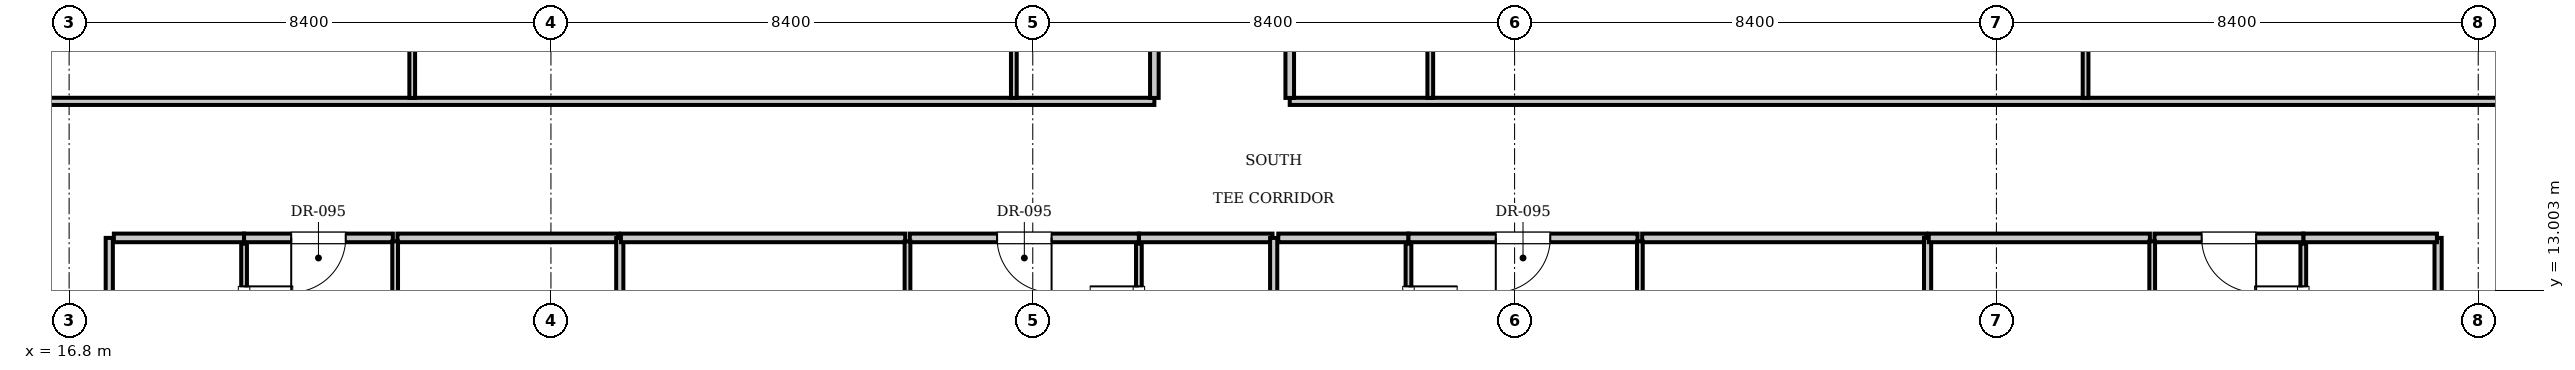
"""IFC4 building model, lengths in metres.
Left out: names, types, materials, properties, quantities, classifications, styles, units other than length and angle.
Written with IfcOpenShell. Run it as: python <this file> out.ifc"""

import sys

from ifc_helpers import new_model, si_unit, direction, frame, frame_2d, origin, place, context, subcontext, project, spatial, rectangle, extrude, element, fill, save


model = new_model("IFC4")
c1 = context("Model", 3, precision=1e-05, world=origin(), true_north=direction((0.0, 1.0)))
c2 = subcontext(c1, "Body", "Model", "MODEL_VIEW")
j1 = project(units=[si_unit("LENGTHUNIT", "METRE"), si_unit("PLANEANGLEUNIT", "RADIAN")], contexts=[c1])
p1 = place(None, origin())
s1 = spatial("IfcSite", under=j1, at=p1, CompositionType="ELEMENT")
p2 = place(p1, origin())
s2 = spatial("IfcBuilding", under=s1, at=p2, CompositionType="ELEMENT")
p3 = place(p2, frame((0.0, 0.0, 185.15)))
s3 = spatial("IfcBuildingStorey", under=s2, at=p3, CompositionType="ELEMENT", Elevation=185.15)
for number, where, z_axis, x_axis in (
    (1, (17.5, 9.0, 0.0), (0.0, 0.0, 1.0), (0.0, 1.0, 0.0)),
    (2, (58.1, 9.0, 0.0), (0.0, 0.0, 1.0), (0.0, 1.0, 0.0)),
):
    element("IfcWall", number, at=place(p3, frame(where, z_axis=z_axis, x_axis=x_axis)), inside=s3, PredefinedType="PARTITIONING", context=c2, shape_type="SweptSolid", body=[
        extrude(rectangle(XDim=4.92, YDim=0.125, at=frame_2d((2.46, 0.0))), origin(), (0.0, 0.0, 1.0), 3.61),
    ])
p4 = place(p3, frame((17.58, 13.92, 0.0), z_axis=(0.0, 0.0, 1.0), x_axis=(1.0, 0.0, 0.0)))
e3 = element("IfcWall", 3, at=p4, inside=s3, PredefinedType="PARTITIONING", context=c2, shape_type="SweptSolid", body=[
    extrude(rectangle(XDim=2.27, YDim=0.15, at=frame_2d((1.135, 0.0))), origin(), (0.0, 0.0, 1.0), 3.61),
])
p5 = place(p3, frame((19.85, 11.48, 0.0), z_axis=(0.0, 0.0, 1.0), x_axis=(0.0, 1.0, 0.0)))
e4 = element("IfcWall", 4, at=p5, inside=s3, PredefinedType="PARTITIONING", context=c2, shape_type="SweptSolid", body=[
    extrude(rectangle(XDim=2.34, YDim=0.1, at=frame_2d((1.17, 0.0))), origin(), (0.0, 0.0, 1.0), 3.61),
])
p6 = place(p5, frame((0.745, 0.0, 0.0)))
e5 = element("IfcOpeningElement", 5, at=p6, cuts=e4, PredefinedType="OPENING", context=c2, shape_type="SweptSolid", body=[
    extrude(rectangle(XDim=0.85, YDim=2.1, at=frame_2d((0.425, 1.05))), frame((0.0, 0.06, 0.0), z_axis=(0.0, -1.0, 0.0), x_axis=(1.0, 0.0, 0.0)), (0.0, 0.0, 1.0), 0.12),
])
p7 = place(p3, frame((19.85, 13.92, 0.0), z_axis=(0.0, 0.0, 1.0), x_axis=(1.0, 0.0, 0.0)))
e6 = element("IfcWall", 6, at=p7, inside=s3, PredefinedType="PARTITIONING", context=c2, shape_type="SweptSolid", body=[
    extrude(rectangle(XDim=2.594, YDim=0.15, at=frame_2d((1.297, 0.0))), origin(), (0.0, 0.0, 1.0), 3.61),
])
p8 = place(p7, frame((0.822, 0.0, 0.0)))
e7 = element("IfcOpeningElement", 7, at=p8, cuts=e6, PredefinedType="OPENING", context=c2, shape_type="SweptSolid", body=[
    extrude(rectangle(XDim=0.95, YDim=2.15, at=frame_2d((0.475, 1.075))), frame((0.0, 0.085, 0.0), z_axis=(0.0, -1.0, 0.0), x_axis=(1.0, 0.0, 0.0)), (0.0, 0.0, 1.0), 0.17),
])
p9 = place(p3, frame((22.524, 13.92, 0.0), z_axis=(0.0, 0.0, 1.0), x_axis=(1.0, 0.0, 0.0)))
e8 = element("IfcWall", 8, at=p9, inside=s3, PredefinedType="PARTITIONING", context=c2, shape_type="SweptSolid", body=[
    extrude(rectangle(XDim=3.856, YDim=0.15, at=frame_2d((1.928, 0.0))), origin(), (0.0, 0.0, 1.0), 3.61),
])
p10 = place(p3, frame((22.484, 4.63, 0.0), z_axis=(0.0, 0.0, 1.0), x_axis=(0.0, 1.0, 0.0)))
e9 = element("IfcWall", 9, at=p10, inside=s3, PredefinedType="PARTITIONING", context=c2, shape_type="SweptSolid", body=[
    extrude(rectangle(XDim=9.23, YDim=0.1, at=frame_2d((4.615, 0.0))), origin(), (0.0, 0.0, 1.0), 3.61),
])
p11 = place(p10, frame((1.6, 0.0, 0.0)))
e10 = element("IfcOpeningElement", 10, at=p11, cuts=e9, PredefinedType="OPENING", context=c2, shape_type="SweptSolid", body=[
    extrude(rectangle(XDim=0.9, YDim=2.1, at=frame_2d((0.45, 1.05))), frame((0.0, 0.06, 0.0), z_axis=(0.0, -1.0, 0.0), x_axis=(1.0, 0.0, 0.0)), (0.0, 0.0, 1.0), 0.12),
])
p12 = place(p3, frame((26.4, 4.7, 0.0), z_axis=(0.0, 0.0, 1.0), x_axis=(0.0, 1.0, 0.0)))
e11 = element("IfcWall", 11, at=p12, inside=s3, PredefinedType="PARTITIONING", context=c2, shape_type="SweptSolid", body=[
    extrude(rectangle(XDim=9.22, YDim=0.125, at=frame_2d((4.61, 0.0))), origin(), (0.0, 0.0, 1.0), 3.61),
])
p13 = place(p3, frame((35.45, 13.92, 0.0), z_axis=(0.0, 0.0, 1.0), x_axis=(1.0, 0.0, 0.0)))
e12 = element("IfcWall", 12, at=p13, inside=s3, PredefinedType="PARTITIONING", context=c2, shape_type="SweptSolid", body=[
    extrude(rectangle(XDim=2.33, YDim=0.15, at=frame_2d((1.165, 0.0))), origin(), (0.0, 0.0, 1.0), 3.61),
])
p14 = place(p3, frame((35.45, 11.48, 0.0), z_axis=(0.0, 0.0, 1.0), x_axis=(0.0, 1.0, 0.0)))
e13 = element("IfcWall", 13, at=p14, inside=s3, PredefinedType="PARTITIONING", context=c2, shape_type="SweptSolid", body=[
    extrude(rectangle(XDim=2.34, YDim=0.1, at=frame_2d((1.17, 0.0))), origin(), (0.0, 0.0, 1.0), 3.61),
])
p15 = place(p14, frame((0.745, 0.0, 0.0)))
e14 = element("IfcOpeningElement", 14, at=p15, cuts=e13, PredefinedType="OPENING", context=c2, shape_type="SweptSolid", body=[
    extrude(rectangle(XDim=0.85, YDim=2.1, at=frame_2d((0.425, 1.05))), frame((0.0, 0.06, 0.0), z_axis=(0.0, -1.0, 0.0), x_axis=(1.0, 0.0, 0.0)), (0.0, 0.0, 1.0), 0.12),
])
p16 = place(p3, frame((26.42, 13.92, 0.0), z_axis=(0.0, 0.0, 1.0), x_axis=(1.0, 0.0, 0.0)))
e15 = element("IfcWall", 15, at=p16, inside=s3, PredefinedType="PARTITIONING", context=c2, shape_type="SweptSolid", body=[
    extrude(rectangle(XDim=4.956, YDim=0.15, at=frame_2d((2.478, 0.0))), origin(), (0.0, 0.0, 1.0), 3.61),
])
p17 = place(p3, frame((31.456, 13.92, 0.0), z_axis=(0.0, 0.0, 1.0), x_axis=(1.0, 0.0, 0.0)))
e16 = element("IfcWall", 16, at=p17, inside=s3, PredefinedType="PARTITIONING", context=c2, shape_type="SweptSolid", body=[
    extrude(rectangle(XDim=3.994, YDim=0.15, at=frame_2d((1.997, 0.0))), origin(), (0.0, 0.0, 1.0), 3.61),
])
p18 = place(p17, frame((1.522, 0.0, 0.0)))
e17 = element("IfcOpeningElement", 17, at=p18, cuts=e16, PredefinedType="OPENING", context=c2, shape_type="SweptSolid", body=[
    extrude(rectangle(XDim=0.95, YDim=2.15, at=frame_2d((0.475, 1.075))), frame((0.0, 0.085, 0.0), z_axis=(0.0, -1.0, 0.0), x_axis=(1.0, 0.0, 0.0)), (0.0, 0.0, 1.0), 0.17),
])
p19 = place(p3, frame((31.416, 4.63, 0.0), z_axis=(0.0, 0.0, 1.0), x_axis=(0.0, 1.0, 0.0)))
e18 = element("IfcWall", 18, at=p19, inside=s3, PredefinedType="PARTITIONING", context=c2, shape_type="SweptSolid", body=[
    extrude(rectangle(XDim=9.23, YDim=0.1, at=frame_2d((4.615, 0.0))), origin(), (0.0, 0.0, 1.0), 3.61),
])
p20 = place(p19, frame((1.6, 0.0, 0.0)))
e19 = element("IfcOpeningElement", 19, at=p20, cuts=e18, PredefinedType="OPENING", context=c2, shape_type="SweptSolid", body=[
    extrude(rectangle(XDim=0.9, YDim=2.1, at=frame_2d((0.45, 1.05))), frame((0.0, 0.06, 0.0), z_axis=(0.0, -1.0, 0.0), x_axis=(1.0, 0.0, 0.0)), (0.0, 0.0, 1.0), 0.12),
])
p21 = place(p3, frame((37.8, 4.7, 0.0), z_axis=(0.0, 0.0, 1.0), x_axis=(0.0, 1.0, 0.0)))
e20 = element("IfcWall", 20, at=p21, inside=s3, PredefinedType="PARTITIONING", context=c2, shape_type="SweptSolid", body=[
    extrude(rectangle(XDim=9.22, YDim=0.125, at=frame_2d((4.61, 0.0))), origin(), (0.0, 0.0, 1.0), 3.293),
])
p22 = place(p3, frame((37.88, 13.92, 0.0), z_axis=(0.0, 0.0, 1.0), x_axis=(1.0, 0.0, 0.0)))
e21 = element("IfcWall", 21, at=p22, inside=s3, PredefinedType="PARTITIONING", context=c2, shape_type="SweptSolid", body=[
    extrude(rectangle(XDim=2.27, YDim=0.15, at=frame_2d((1.135, 0.0))), origin(), (0.0, 0.0, 1.0), 3.61),
])
p23 = place(p3, frame((40.15, 11.48, 0.0), z_axis=(0.0, 0.0, 1.0), x_axis=(0.0, 1.0, 0.0)))
e22 = element("IfcWall", 22, at=p23, inside=s3, PredefinedType="PARTITIONING", context=c2, shape_type="SweptSolid", body=[
    extrude(rectangle(XDim=2.34, YDim=0.1, at=frame_2d((1.17, 0.0))), origin(), (0.0, 0.0, 1.0), 3.61),
])
p24 = place(p23, frame((0.745, 0.0, 0.0)))
e23 = element("IfcOpeningElement", 23, at=p24, cuts=e22, PredefinedType="OPENING", context=c2, shape_type="SweptSolid", body=[
    extrude(rectangle(XDim=0.85, YDim=2.1, at=frame_2d((0.425, 1.05))), frame((0.0, 0.06, 0.0), z_axis=(0.0, -1.0, 0.0), x_axis=(1.0, 0.0, 0.0)), (0.0, 0.0, 1.0), 0.12),
])
p25 = place(p3, frame((40.15, 13.92, 0.0), z_axis=(0.0, 0.0, 1.0), x_axis=(1.0, 0.0, 0.0)))
e24 = element("IfcWall", 24, at=p25, inside=s3, PredefinedType="PARTITIONING", context=c2, shape_type="SweptSolid", body=[
    extrude(rectangle(XDim=3.994, YDim=0.15, at=frame_2d((1.997, 0.0))), origin(), (0.0, 0.0, 1.0), 3.61),
])
p26 = place(p25, frame((1.522, 0.0, 0.0)))
e25 = element("IfcOpeningElement", 25, at=p26, cuts=e24, PredefinedType="OPENING", context=c2, shape_type="SweptSolid", body=[
    extrude(rectangle(XDim=0.95, YDim=2.15, at=frame_2d((0.475, 1.075))), frame((0.0, 0.085, 0.0), z_axis=(0.0, -1.0, 0.0), x_axis=(1.0, 0.0, 0.0)), (0.0, 0.0, 1.0), 0.17),
])
p27 = place(p3, frame((44.224, 13.92, 0.0), z_axis=(0.0, 0.0, 1.0), x_axis=(1.0, 0.0, 0.0)))
e26 = element("IfcWall", 26, at=p27, inside=s3, PredefinedType="PARTITIONING", context=c2, shape_type="SweptSolid", body=[
    extrude(rectangle(XDim=4.956, YDim=0.15, at=frame_2d((2.478, 0.0))), origin(), (0.0, 0.0, 1.0), 3.61),
])
p28 = place(p3, frame((44.184, 4.63, 0.0), z_axis=(0.0, 0.0, 1.0), x_axis=(0.0, 1.0, 0.0)))
e27 = element("IfcWall", 27, at=p28, inside=s3, PredefinedType="PARTITIONING", context=c2, shape_type="SweptSolid", body=[
    extrude(rectangle(XDim=9.23, YDim=0.1, at=frame_2d((4.615, 0.0))), origin(), (0.0, 0.0, 1.0), 3.61),
])
p29 = place(p28, frame((1.6, 0.0, 0.0)))
e28 = element("IfcOpeningElement", 28, at=p29, cuts=e27, PredefinedType="OPENING", context=c2, shape_type="SweptSolid", body=[
    extrude(rectangle(XDim=0.9, YDim=2.1, at=frame_2d((0.45, 1.05))), frame((0.0, 0.06, 0.0), z_axis=(0.0, -1.0, 0.0), x_axis=(1.0, 0.0, 0.0)), (0.0, 0.0, 1.0), 0.12),
])
p30 = place(p3, frame((49.2, 4.7, 0.0), z_axis=(0.0, 0.0, 1.0), x_axis=(0.0, 1.0, 0.0)))
e29 = element("IfcWall", 29, at=p30, inside=s3, PredefinedType="PARTITIONING", context=c2, shape_type="SweptSolid", body=[
    extrude(rectangle(XDim=9.22, YDim=0.125, at=frame_2d((4.61, 0.0))), origin(), (0.0, 0.0, 1.0), 3.61),
])
p31 = place(p3, frame((55.75, 13.92, 0.0), z_axis=(0.0, 0.0, 1.0), x_axis=(1.0, 0.0, 0.0)))
e30 = element("IfcWall", 30, at=p31, inside=s3, PredefinedType="PARTITIONING", context=c2, shape_type="SweptSolid", body=[
    extrude(rectangle(XDim=2.33, YDim=0.15, at=frame_2d((1.165, 0.0))), origin(), (0.0, 0.0, 1.0), 3.61),
])
p32 = place(p3, frame((55.75, 11.48, 0.0), z_axis=(0.0, 0.0, 1.0), x_axis=(0.0, 1.0, 0.0)))
e31 = element("IfcWall", 31, at=p32, inside=s3, PredefinedType="PARTITIONING", context=c2, shape_type="SweptSolid", body=[
    extrude(rectangle(XDim=2.34, YDim=0.1, at=frame_2d((1.17, 0.0))), origin(), (0.0, 0.0, 1.0), 3.61),
])
p33 = place(p32, frame((0.745, 0.0, 0.0)))
e32 = element("IfcOpeningElement", 32, at=p33, cuts=e31, PredefinedType="OPENING", context=c2, shape_type="SweptSolid", body=[
    extrude(rectangle(XDim=0.85, YDim=2.1, at=frame_2d((0.425, 1.05))), frame((0.0, 0.06, 0.0), z_axis=(0.0, -1.0, 0.0), x_axis=(1.0, 0.0, 0.0)), (0.0, 0.0, 1.0), 0.12),
])
p34 = place(p3, frame((49.22, 13.92, 0.0), z_axis=(0.0, 0.0, 1.0), x_axis=(1.0, 0.0, 0.0)))
e33 = element("IfcWall", 33, at=p34, inside=s3, PredefinedType="PARTITIONING", context=c2, shape_type="SweptSolid", body=[
    extrude(rectangle(XDim=3.856, YDim=0.15, at=frame_2d((1.928, 0.0))), origin(), (0.0, 0.0, 1.0), 3.61),
])
p35 = place(p3, frame((53.156, 13.92, 0.0), z_axis=(0.0, 0.0, 1.0), x_axis=(1.0, 0.0, 0.0)))
e34 = element("IfcWall", 34, at=p35, inside=s3, PredefinedType="PARTITIONING", context=c2, shape_type="SweptSolid", body=[
    extrude(rectangle(XDim=2.594, YDim=0.15, at=frame_2d((1.297, 0.0))), origin(), (0.0, 0.0, 1.0), 3.61),
])
p36 = place(p35, frame((0.822, 0.0, 0.0)))
e35 = element("IfcOpeningElement", 35, at=p36, cuts=e34, PredefinedType="OPENING", context=c2, shape_type="SweptSolid", body=[
    extrude(rectangle(XDim=0.95, YDim=2.15, at=frame_2d((0.475, 1.075))), frame((0.0, 0.085, 0.0), z_axis=(0.0, -1.0, 0.0), x_axis=(1.0, 0.0, 0.0)), (0.0, 0.0, 1.0), 0.17),
])
p37 = place(p3, frame((53.116, 4.63, 0.0), z_axis=(0.0, 0.0, 1.0), x_axis=(0.0, 1.0, 0.0)))
e36 = element("IfcWall", 36, at=p37, inside=s3, PredefinedType="PARTITIONING", context=c2, shape_type="SweptSolid", body=[
    extrude(rectangle(XDim=9.23, YDim=0.1, at=frame_2d((4.615, 0.0))), origin(), (0.0, 0.0, 1.0), 3.61),
])
p38 = place(p37, frame((1.6, 0.0, 0.0)))
e37 = element("IfcOpeningElement", 37, at=p38, cuts=e36, PredefinedType="OPENING", context=c2, shape_type="SweptSolid", body=[
    extrude(rectangle(XDim=0.9, YDim=2.1, at=frame_2d((0.45, 1.05))), frame((0.0, 0.06, 0.0), z_axis=(0.0, -1.0, 0.0), x_axis=(1.0, 0.0, 0.0)), (0.0, 0.0, 1.0), 0.12),
])
p39 = place(p3, frame((13.2, 16.3, 0.0), z_axis=(0.0, 0.0, 1.0), x_axis=(1.0, 0.0, 0.0)))
e38 = element("IfcWall", 38, at=p39, inside=s3, PredefinedType="PARTITIONING", context=c2, shape_type="SweptSolid", body=[
    extrude(rectangle(XDim=22.52, YDim=0.125, at=frame_2d((11.26, 0.0))), origin(), (0.0, 0.0, 1.0), 3.61),
])
p40 = place(p3, frame((38.08, 16.3, 0.0), z_axis=(0.0, 0.0, 1.0), x_axis=(1.0, 0.0, 0.0)))
e39 = element("IfcWall", 39, at=p40, inside=s3, PredefinedType="PARTITIONING", context=c2, shape_type="SweptSolid", body=[
    extrude(rectangle(XDim=24.32, YDim=0.125, at=frame_2d((12.16, 0.0))), origin(), (0.0, 0.0, 1.0), 3.61),
])
p41 = place(p3, frame((35.72, 16.36, 0.0), z_axis=(0.0, 0.0, 1.0), x_axis=(0.0, 1.0, 0.0)))
e40 = element("IfcWall", 40, at=p41, inside=s3, PredefinedType="PARTITIONING", context=c2, shape_type="SweptSolid", body=[
    extrude(rectangle(XDim=1.89, YDim=0.15, at=frame_2d((0.945, 0.0))), origin(), (0.0, 0.0, 1.0), 3.61),
])
p42 = place(p3, frame((33.27, 16.36, 0.0), z_axis=(0.0, 0.0, 1.0), x_axis=(0.0, 1.0, 0.0)))
e41 = element("IfcWall", 41, at=p42, inside=s3, PredefinedType="PARTITIONING", context=c2, shape_type="SweptSolid", body=[
    extrude(rectangle(XDim=1.89, YDim=0.1, at=frame_2d((0.945, 0.0))), origin(), (0.0, 0.0, 1.0), 3.61),
])
p43 = place(p3, frame((22.781, 16.36, 0.0), z_axis=(0.0, 0.0, 1.0), x_axis=(0.0, 1.0, 0.0)))
e42 = element("IfcWall", 42, at=p43, inside=s3, PredefinedType="PARTITIONING", context=c2, shape_type="SweptSolid", body=[
    extrude(rectangle(XDim=3.58, YDim=0.1, at=frame_2d((1.79, 0.0))), origin(), (0.0, 0.0, 1.0), 3.61),
])
p44 = place(p43, frame((1.34, 0.0, 0.0)))
e43 = element("IfcOpeningElement", 43, at=p44, cuts=e42, PredefinedType="OPENING", context=c2, shape_type="SweptSolid", body=[
    extrude(rectangle(XDim=0.9, YDim=2.1, at=frame_2d((0.45, 1.05))), frame((0.0, 0.06, 0.0), z_axis=(0.0, -1.0, 0.0), x_axis=(1.0, 0.0, 0.0)), (0.0, 0.0, 1.0), 0.12),
])
p45 = place(p3, frame((38.08, 16.36, 0.0), z_axis=(0.0, 0.0, 1.0), x_axis=(0.0, 1.0, 0.0)))
e44 = element("IfcWall", 44, at=p45, inside=s3, PredefinedType="PARTITIONING", context=c2, shape_type="SweptSolid", body=[
    extrude(rectangle(XDim=1.89, YDim=0.15, at=frame_2d((0.945, 0.0))), origin(), (0.0, 0.0, 1.0), 3.61),
])
p46 = place(p3, frame((40.53, 16.36, 0.0), z_axis=(0.0, 0.0, 1.0), x_axis=(0.0, 1.0, 0.0)))
e45 = element("IfcWall", 45, at=p46, inside=s3, PredefinedType="PARTITIONING", context=c2, shape_type="SweptSolid", body=[
    extrude(rectangle(XDim=1.89, YDim=0.1, at=frame_2d((0.945, 0.0))), origin(), (0.0, 0.0, 1.0), 3.61),
])
p47 = place(p3, frame((51.954, 16.36, 0.0), z_axis=(0.0, 0.0, 1.0), x_axis=(0.0, 1.0, 0.0)))
e46 = element("IfcWall", 46, at=p47, inside=s3, PredefinedType="PARTITIONING", context=c2, shape_type="SweptSolid", body=[
    extrude(rectangle(XDim=3.58, YDim=0.1, at=frame_2d((1.79, 0.0))), origin(), (0.0, 0.0, 1.0), 3.61),
])
p48 = place(p47, frame((2.42, 0.0, 0.0)))
e47 = element("IfcOpeningElement", 47, at=p48, cuts=e46, PredefinedType="OPENING", context=c2, shape_type="SweptSolid", body=[
    extrude(rectangle(XDim=0.9, YDim=2.1, at=frame_2d((0.45, 1.05))), frame((0.0, 0.06, 0.0), z_axis=(0.0, -1.0, 0.0), x_axis=(1.0, 0.0, 0.0)), (0.0, 0.0, 1.0), 0.12),
])
p49 = place(p6, frame((0.85, 0.0, 0.0), z_axis=(0.0, 0.0, 1.0), x_axis=(-1.0, 0.0, 0.0)))
e48 = element("IfcDoor", 48, at=p49, inside=s3, OperationType="SINGLE_SWING_LEFT", PredefinedType="DOOR", context=c2, shape_type="SweptSolid", body=[
    extrude(rectangle(XDim=0.85, YDim=2.1, at=frame_2d((0.425, 1.05))), frame((0.0, 0.025, 0.0), z_axis=(0.0, -1.0, 0.0), x_axis=(1.0, 0.0, 0.0)), (0.0, 0.0, 1.0), 0.05),
])
fill(e5, e48)
p50 = place(p8, frame((0.95, 0.0, 0.0), z_axis=(0.0, 0.0, 1.0), x_axis=(-1.0, 0.0, 0.0)))
e49 = element("IfcDoor", 49, at=p50, inside=s3, OperationType="SINGLE_SWING_RIGHT", PredefinedType="DOOR", context=c2, shape_type="SweptSolid", body=[
    extrude(rectangle(XDim=0.95, YDim=2.15, at=frame_2d((0.475, 1.075))), frame((0.0, 0.025, 0.0), z_axis=(0.0, -1.0, 0.0), x_axis=(1.0, 0.0, 0.0)), (0.0, 0.0, 1.0), 0.05),
])
fill(e7, e49)
p51 = place(p15, origin())
e50 = element("IfcDoor", 50, at=p51, inside=s3, OperationType="SINGLE_SWING_RIGHT", PredefinedType="DOOR", context=c2, shape_type="SweptSolid", body=[
    extrude(rectangle(XDim=0.85, YDim=2.1, at=frame_2d((0.425, 1.05))), frame((0.0, 0.025, 0.0), z_axis=(0.0, -1.0, 0.0), x_axis=(1.0, 0.0, 0.0)), (0.0, 0.0, 1.0), 0.05),
])
fill(e14, e50)
p52 = place(p18, frame((0.95, 0.0, 0.0), z_axis=(0.0, 0.0, 1.0), x_axis=(-1.0, 0.0, 0.0)))
e51 = element("IfcDoor", 51, at=p52, inside=s3, OperationType="SINGLE_SWING_LEFT", PredefinedType="DOOR", context=c2, shape_type="SweptSolid", body=[
    extrude(rectangle(XDim=0.95, YDim=2.15, at=frame_2d((0.475, 1.075))), frame((0.0, 0.025, 0.0), z_axis=(0.0, -1.0, 0.0), x_axis=(1.0, 0.0, 0.0)), (0.0, 0.0, 1.0), 0.05),
])
fill(e17, e51)
p53 = place(p24, frame((0.85, 0.0, 0.0), z_axis=(0.0, 0.0, 1.0), x_axis=(-1.0, 0.0, 0.0)))
e52 = element("IfcDoor", 52, at=p53, inside=s3, OperationType="SINGLE_SWING_LEFT", PredefinedType="DOOR", context=c2, shape_type="SweptSolid", body=[
    extrude(rectangle(XDim=0.85, YDim=2.1, at=frame_2d((0.425, 1.05))), frame((0.0, 0.025, 0.0), z_axis=(0.0, -1.0, 0.0), x_axis=(1.0, 0.0, 0.0)), (0.0, 0.0, 1.0), 0.05),
])
fill(e23, e52)
p54 = place(p26, frame((0.95, 0.0, 0.0), z_axis=(0.0, 0.0, 1.0), x_axis=(-1.0, 0.0, 0.0)))
e53 = element("IfcDoor", 53, at=p54, inside=s3, OperationType="SINGLE_SWING_RIGHT", PredefinedType="DOOR", context=c2, shape_type="SweptSolid", body=[
    extrude(rectangle(XDim=0.95, YDim=2.15, at=frame_2d((0.475, 1.075))), frame((0.0, 0.025, 0.0), z_axis=(0.0, -1.0, 0.0), x_axis=(1.0, 0.0, 0.0)), (0.0, 0.0, 1.0), 0.05),
])
fill(e25, e53)
p55 = place(p33, origin())
e54 = element("IfcDoor", 54, at=p55, inside=s3, OperationType="SINGLE_SWING_RIGHT", PredefinedType="DOOR", context=c2, shape_type="SweptSolid", body=[
    extrude(rectangle(XDim=0.85, YDim=2.1, at=frame_2d((0.425, 1.05))), frame((0.0, 0.025, 0.0), z_axis=(0.0, -1.0, 0.0), x_axis=(1.0, 0.0, 0.0)), (0.0, 0.0, 1.0), 0.05),
])
fill(e32, e54)
p56 = place(p36, frame((0.95, 0.0, 0.0), z_axis=(0.0, 0.0, 1.0), x_axis=(-1.0, 0.0, 0.0)))
e55 = element("IfcDoor", 55, at=p56, inside=s3, OperationType="SINGLE_SWING_LEFT", PredefinedType="DOOR", context=c2, shape_type="SweptSolid", body=[
    extrude(rectangle(XDim=0.95, YDim=2.15, at=frame_2d((0.475, 1.075))), frame((0.0, 0.025, 0.0), z_axis=(0.0, -1.0, 0.0), x_axis=(1.0, 0.0, 0.0)), (0.0, 0.0, 1.0), 0.05),
])
fill(e35, e55)
save(model, sys.argv[1])
